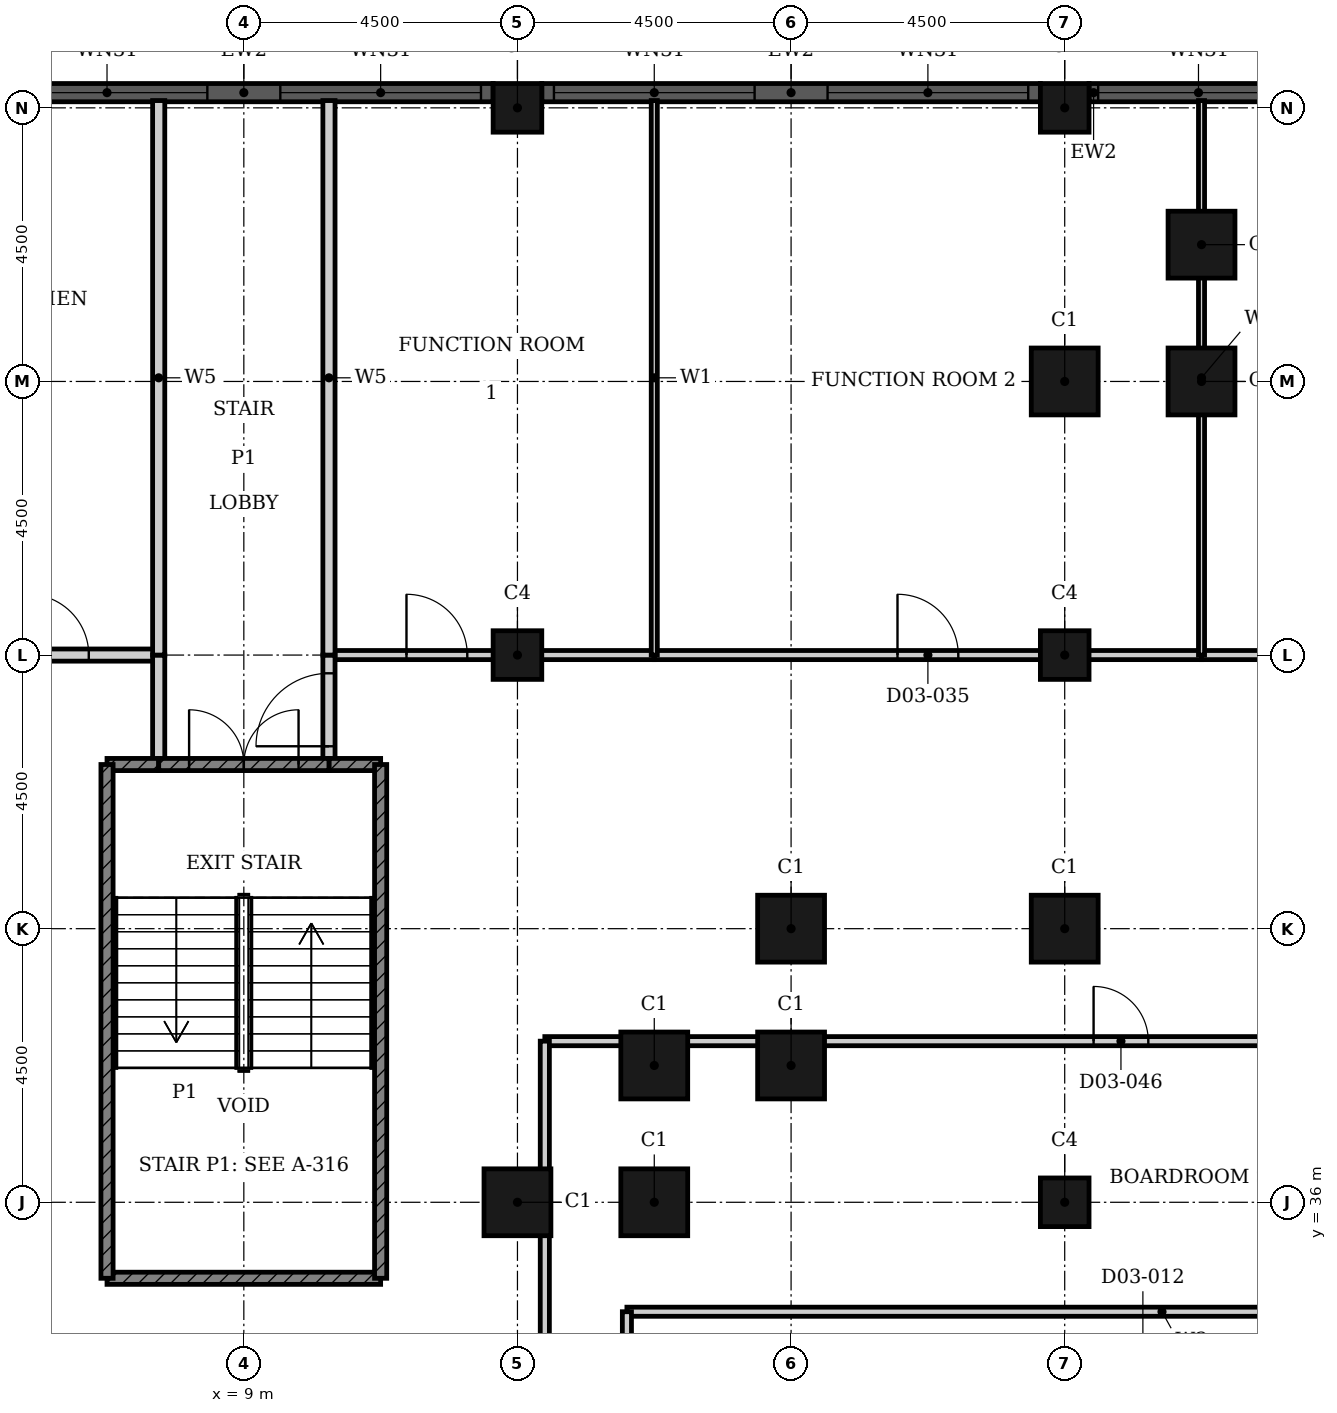
"""IFC4 building model, lengths in metres.
Left out: names, types, materials, properties, quantities, classifications, styles, units other than length and angle.
Written with IfcOpenShell. Run it as: python <this file> out.ifc"""

import sys

from ifc_helpers import new_model, si_unit, direction, frame, frame_2d, origin, origin_2d, place, context, subcontext, project, spatial, rectangle, hollow_rectangle, extrude, element, fill, save


model = new_model("IFC4")
c1 = context("Model", 3, precision=1e-05, world=origin(), true_north=direction((0.0, 1.0)))
c2 = subcontext(c1, "Body", "Model", "MODEL_VIEW")
j1 = project(units=[si_unit("LENGTHUNIT", "METRE"), si_unit("PLANEANGLEUNIT", "RADIAN")], contexts=[c1])
p1 = place(None, origin())
s1 = spatial("IfcSite", under=j1, at=p1, CompositionType="ELEMENT")
p2 = place(p1, origin())
s2 = spatial("IfcBuilding", under=s1, at=p2, CompositionType="ELEMENT")
p3 = place(p2, frame((0.0, 0.0, 17.4)))
s3 = spatial("IfcBuildingStorey", under=s2, at=p3, CompositionType="ELEMENT", Elevation=17.4)
for number, where, z_axis, x_axis in (
    (1, (24.75, 51.75, 0.0), (0.0, 0.0, 1.0), (1.0, 0.0, 0.0)),
    (2, (24.75, 49.5, 0.0), (0.0, 0.0, 1.0), (1.0, 0.0, 0.0)),
    (3, (22.5, 49.5, 0.0), (0.0, 0.0, 1.0), (1.0, 0.0, 0.0)),
    (4, (22.5, 40.5, 0.0), (0.0, 0.0, 1.0), (1.0, 0.0, 0.0)),
    (5, (18.0, 40.5, 0.0), (0.0, 0.0, 1.0), (1.0, 0.0, 0.0)),
    (6, (18.0, 38.25, 0.0), (0.0, 0.0, 1.0), (1.0, 0.0, 0.0)),
    (7, (15.75, 38.25, 0.0), (0.0, 0.0, 1.0), (1.0, 0.0, 0.0)),
    (8, (15.75, 36.0, 0.0), (0.0, 0.0, 1.0), (1.0, 0.0, 0.0)),
    (9, (13.5, 36.0, 0.0), (0.0, 0.0, 1.0), (1.0, 0.0, 0.0)),
):
    element("IfcColumn", number, at=place(p3, frame(where, z_axis=z_axis, x_axis=x_axis)), inside=s3, PredefinedType="COLUMN", context=c2, shape_type="SweptSolid", body=[
        extrude(hollow_rectangle(XDim=1.1, YDim=1.1, WallThickness=0.036, at=origin_2d()), origin(), (0.0, 0.0, 1.0), 6.6),
    ])
for number, where, z_axis, x_axis in (
    (10, (13.5, 54.0, 0.0), (0.0, 0.0, 1.0), (1.0, 0.0, 0.0)),
    (11, (22.5, 54.0, 0.0), (0.0, 0.0, 1.0), (1.0, 0.0, 0.0)),
    (12, (13.5, 45.0, 0.0), (0.0, 0.0, 1.0), (1.0, 0.0, 0.0)),
    (13, (22.5, 36.0, 0.0), (0.0, 0.0, 1.0), (1.0, 0.0, 0.0)),
    (14, (22.5, 45.0, 0.0), (0.0, 0.0, 1.0), (1.0, 0.0, 0.0)),
):
    element("IfcColumn", number, at=place(p3, frame(where, z_axis=z_axis, x_axis=x_axis)), inside=s3, PredefinedType="COLUMN", context=c2, shape_type="SweptSolid", body=[
        extrude(hollow_rectangle(XDim=0.8, YDim=0.8, WallThickness=0.025, at=origin_2d()), origin(), (0.0, 0.0, 1.0), 6.6),
    ])
p4 = place(p3, frame((26.45, 54.25, 0.0), z_axis=(0.0, 0.0, 1.0), x_axis=(-1.0, 0.0, 0.0)))
e15 = element("IfcWall", 15, at=p4, inside=s3, PredefinedType="SOLIDWALL", context=c2, shape_type="SweptSolid", body=[
    extrude(rectangle(XDim=3.55, YDim=0.3, at=frame_2d((1.775, 0.0))), origin(), (0.0, 0.0, 1.0), 6.6),
])
p5 = place(p4, frame((0.1, 0.0, 0.9)))
e16 = element("IfcOpeningElement", 16, at=p5, cuts=e15, PredefinedType="OPENING", context=c2, shape_type="SweptSolid", body=[
    extrude(rectangle(XDim=3.3, YDim=3.6, at=frame_2d((1.65, 1.8))), frame((0.0, 0.16, 0.0), z_axis=(0.0, -1.0, 0.0), x_axis=(1.0, 0.0, 0.0)), (0.0, 0.0, 1.0), 0.32),
])
p6 = place(p3, frame((22.1, 54.25, 0.0), z_axis=(0.0, 0.0, 1.0), x_axis=(-1.0, 0.0, 0.0)))
e17 = element("IfcWall", 17, at=p6, inside=s3, PredefinedType="SOLIDWALL", context=c2, shape_type="SweptSolid", body=[
    extrude(rectangle(XDim=8.2, YDim=0.3, at=frame_2d((4.1, 0.0))), origin(), (0.0, 0.0, 1.0), 6.6),
])
p7 = place(p6, frame((0.2, 0.0, 0.9)))
e18 = element("IfcOpeningElement", 18, at=p7, cuts=e17, PredefinedType="OPENING", context=c2, shape_type="SweptSolid", body=[
    extrude(rectangle(XDim=3.3, YDim=3.6, at=frame_2d((1.65, 1.8))), frame((0.0, 0.16, 0.0), z_axis=(0.0, -1.0, 0.0), x_axis=(1.0, 0.0, 0.0)), (0.0, 0.0, 1.0), 0.32),
])
p8 = place(p6, frame((4.7, 0.0, 0.9)))
e19 = element("IfcOpeningElement", 19, at=p8, cuts=e17, PredefinedType="OPENING", context=c2, shape_type="SweptSolid", body=[
    extrude(rectangle(XDim=3.3, YDim=3.6, at=frame_2d((1.65, 1.8))), frame((0.0, 0.16, 0.0), z_axis=(0.0, -1.0, 0.0), x_axis=(1.0, 0.0, 0.0)), (0.0, 0.0, 1.0), 0.32),
])
p9 = place(p3, frame((13.1, 54.25, 0.0), z_axis=(0.0, 0.0, 1.0), x_axis=(-1.0, 0.0, 0.0)))
e20 = element("IfcWall", 20, at=p9, inside=s3, PredefinedType="SOLIDWALL", context=c2, shape_type="SweptSolid", body=[
    extrude(rectangle(XDim=8.2, YDim=0.3, at=frame_2d((4.1, 0.0))), origin(), (0.0, 0.0, 1.0), 6.6),
])
p10 = place(p9, frame((0.2, 0.0, 0.9)))
e21 = element("IfcOpeningElement", 21, at=p10, cuts=e20, PredefinedType="OPENING", context=c2, shape_type="SweptSolid", body=[
    extrude(rectangle(XDim=3.3, YDim=3.6, at=frame_2d((1.65, 1.8))), frame((0.0, 0.16, 0.0), z_axis=(0.0, -1.0, 0.0), x_axis=(1.0, 0.0, 0.0)), (0.0, 0.0, 1.0), 0.32),
])
p11 = place(p9, frame((4.7, 0.0, 0.9)))
e22 = element("IfcOpeningElement", 22, at=p11, cuts=e20, PredefinedType="OPENING", context=c2, shape_type="SweptSolid", body=[
    extrude(rectangle(XDim=3.3, YDim=3.6, at=frame_2d((1.65, 1.8))), frame((0.0, 0.16, 0.0), z_axis=(0.0, -1.0, 0.0), x_axis=(1.0, 0.0, 0.0)), (0.0, 0.0, 1.0), 0.32),
])
p12 = place(p3, frame((15.3, 34.2, 0.0), z_axis=(0.0, 0.0, 1.0), x_axis=(1.0, 0.0, 0.0)))
e23 = element("IfcWall", 23, at=p12, inside=s3, PredefinedType="PARTITIONING", context=c2, shape_type="SweptSolid", body=[
    extrude(rectangle(XDim=17.6, YDim=0.15, at=frame_2d((8.8, 0.0))), origin(), (0.0, 0.0, 1.0), 6.25),
])
p13 = place(p3, frame((13.95, 38.65, 0.0), z_axis=(0.0, 0.0, 1.0), x_axis=(1.0, 0.0, 0.0)))
e24 = element("IfcWall", 24, at=p13, inside=s3, PredefinedType="PARTITIONING", context=c2, shape_type="SweptSolid", body=[
    extrude(rectangle(XDim=18.95, YDim=0.15, at=frame_2d((9.475, 0.0))), origin(), (0.0, 0.0, 1.0), 6.25),
])
p14 = place(p13, frame((9.025, 0.0, 0.0)))
e25 = element("IfcOpeningElement", 25, at=p14, cuts=e24, PredefinedType="OPENING", context=c2, shape_type="SweptSolid", body=[
    extrude(rectangle(XDim=0.9, YDim=2.1, at=frame_2d((0.45, 1.05))), frame((0.0, 0.085, 0.0), z_axis=(0.0, -1.0, 0.0), x_axis=(1.0, 0.0, 0.0)), (0.0, 0.0, 1.0), 0.17),
])
p15 = place(p3, frame((10.4, 45.0, 0.0), z_axis=(0.0, 0.0, 1.0), x_axis=(1.0, 0.0, 0.0)))
e26 = element("IfcWall", 26, at=p15, inside=s3, PredefinedType="PARTITIONING", context=c2, shape_type="SweptSolid", body=[
    extrude(rectangle(XDim=5.35, YDim=0.15, at=frame_2d((2.675, 0.0))), origin(), (0.0, 0.0, 1.0), 6.25),
])
p16 = place(p15, frame((1.275, 0.0, 0.0)))
e27 = element("IfcOpeningElement", 27, at=p16, cuts=e26, PredefinedType="OPENING", context=c2, shape_type="SweptSolid", body=[
    extrude(rectangle(XDim=1.0, YDim=2.1, at=frame_2d((0.5, 1.05))), frame((0.0, 0.085, 0.0), z_axis=(0.0, -1.0, 0.0), x_axis=(1.0, 0.0, 0.0)), (0.0, 0.0, 1.0), 0.17),
])
p17 = place(p3, frame((15.75, 45.0, 0.0), z_axis=(0.0, 0.0, 1.0), x_axis=(1.0, 0.0, 0.0)))
e28 = element("IfcWall", 28, at=p17, inside=s3, PredefinedType="PARTITIONING", context=c2, shape_type="SweptSolid", body=[
    extrude(rectangle(XDim=9.0, YDim=0.15, at=frame_2d((4.5, 0.0))), origin(), (0.0, 0.0, 1.0), 6.25),
])
p18 = place(p17, frame((4.0, 0.0, 0.0)))
e29 = element("IfcOpeningElement", 29, at=p18, cuts=e28, PredefinedType="OPENING", context=c2, shape_type="SweptSolid", body=[
    extrude(rectangle(XDim=1.0, YDim=2.1, at=frame_2d((0.5, 1.05))), frame((0.0, 0.085, 0.0), z_axis=(0.0, -1.0, 0.0), x_axis=(1.0, 0.0, 0.0)), (0.0, 0.0, 1.0), 0.17),
])
p19 = place(p3, frame((24.75, 45.0, 0.0), z_axis=(0.0, 0.0, 1.0), x_axis=(1.0, 0.0, 0.0)))
e30 = element("IfcWall", 30, at=p19, inside=s3, PredefinedType="PARTITIONING", context=c2, shape_type="SweptSolid", body=[
    extrude(rectangle(XDim=9.0, YDim=0.15, at=frame_2d((4.5, 0.0))), origin(), (0.0, 0.0, 1.0), 6.25),
])
p20 = place(p19, frame((4.0, 0.0, 0.0)))
e31 = element("IfcOpeningElement", 31, at=p20, cuts=e30, PredefinedType="OPENING", context=c2, shape_type="SweptSolid", body=[
    extrude(rectangle(XDim=1.0, YDim=2.1, at=frame_2d((0.5, 1.05))), frame((0.0, 0.085, 0.0), z_axis=(0.0, -1.0, 0.0), x_axis=(1.0, 0.0, 0.0)), (0.0, 0.0, 1.0), 0.17),
])
p21 = place(p3, frame((13.95, 32.05, 0.0), z_axis=(0.0, 0.0, 1.0), x_axis=(0.0, 1.0, 0.0)))
e32 = element("IfcWall", 32, at=p21, inside=s3, PredefinedType="PARTITIONING", context=c2, shape_type="SweptSolid", body=[
    extrude(rectangle(XDim=6.6, YDim=0.15, at=frame_2d((3.3, 0.0))), origin(), (0.0, 0.0, 1.0), 6.25),
])
p22 = place(p3, frame((15.3, 20.7, 0.0), z_axis=(0.0, 0.0, 1.0), x_axis=(0.0, 1.0, 0.0)))
e33 = element("IfcWall", 33, at=p22, inside=s3, PredefinedType="PARTITIONING", context=c2, shape_type="SweptSolid", body=[
    extrude(rectangle(XDim=13.5, YDim=0.15, at=frame_2d((6.75, 0.0))), origin(), (0.0, 0.0, 1.0), 6.25),
])
for number, where, z_axis, x_axis in (
    (34, (15.75, 45.0, 0.0), (0.0, 0.0, 1.0), (0.0, 1.0, 0.0)),
    (35, (24.75, 45.0, 0.0), (0.0, 0.0, 1.0), (0.0, 1.0, 0.0)),
):
    element("IfcWall", number, at=place(p3, frame(where, z_axis=z_axis, x_axis=x_axis)), inside=s3, PredefinedType="PARTITIONING", context=c2, shape_type="SweptSolid", body=[
        extrude(rectangle(XDim=9.12, YDim=0.1, at=frame_2d((4.56, 0.0))), origin(), (0.0, 0.0, 1.0), 6.25),
    ])
p23 = place(p3, frame((2.5, 45.0, 0.0), z_axis=(0.0, 0.0, 1.0), x_axis=(1.0, 0.0, 0.0)))
e36 = element("IfcWall", 36, at=p23, inside=s3, PredefinedType="PARTITIONING", context=c2, shape_type="SweptSolid", body=[
    extrude(rectangle(XDim=5.1, YDim=0.2, at=frame_2d((2.55, 0.0))), origin(), (0.0, 0.0, 1.0), 6.25),
])
p24 = place(p23, frame((2.95, 0.0, 0.0)))
e37 = element("IfcOpeningElement", 37, at=p24, cuts=e36, PredefinedType="OPENING", context=c2, shape_type="SweptSolid", body=[
    extrude(rectangle(XDim=1.0, YDim=2.1, at=frame_2d((0.5, 1.05))), frame((0.0, 0.11, 0.0), z_axis=(0.0, -1.0, 0.0), x_axis=(1.0, 0.0, 0.0)), (0.0, 0.0, 1.0), 0.22),
])
p25 = place(p3, frame((10.4, 43.2, 0.0), z_axis=(0.0, 0.0, 1.0), x_axis=(0.0, 1.0, 0.0)))
e38 = element("IfcWall", 38, at=p25, inside=s3, PredefinedType="PARTITIONING", context=c2, shape_type="SweptSolid", body=[
    extrude(rectangle(XDim=1.8, YDim=0.2, at=frame_2d((0.9, 0.0))), origin(), (0.0, 0.0, 1.0), 6.25),
])
p26 = place(p25, frame((0.3, 0.0, 0.0)))
e39 = element("IfcOpeningElement", 39, at=p26, cuts=e38, PredefinedType="OPENING", context=c2, shape_type="SweptSolid", body=[
    extrude(rectangle(XDim=1.2, YDim=2.1, at=frame_2d((0.6, 1.05))), frame((0.0, 0.11, 0.0), z_axis=(0.0, -1.0, 0.0), x_axis=(1.0, 0.0, 0.0)), (0.0, 0.0, 1.0), 0.22),
])
p27 = place(p3, frame((10.4, 45.0, 0.0), z_axis=(0.0, 0.0, 1.0), x_axis=(0.0, 1.0, 0.0)))
e40 = element("IfcWall", 40, at=p27, inside=s3, PredefinedType="PARTITIONING", context=c2, shape_type="SweptSolid", body=[
    extrude(rectangle(XDim=9.12, YDim=0.2, at=frame_2d((4.56, 0.0))), origin(), (0.0, 0.0, 1.0), 6.25),
])
p28 = place(p3, frame((7.6, 43.2, 0.0), z_axis=(0.0, 0.0, 1.0), x_axis=(0.0, 1.0, 0.0)))
e41 = element("IfcWall", 41, at=p28, inside=s3, PredefinedType="PARTITIONING", context=c2, shape_type="SweptSolid", body=[
    extrude(rectangle(XDim=1.8, YDim=0.2, at=frame_2d((0.9, 0.0))), origin(), (0.0, 0.0, 1.0), 6.25),
])
p29 = place(p3, frame((7.6, 45.0, 0.0), z_axis=(0.0, 0.0, 1.0), x_axis=(0.0, 1.0, 0.0)))
e42 = element("IfcWall", 42, at=p29, inside=s3, PredefinedType="PARTITIONING", context=c2, shape_type="SweptSolid", body=[
    extrude(rectangle(XDim=9.12, YDim=0.2, at=frame_2d((4.56, 0.0))), origin(), (0.0, 0.0, 1.0), 6.25),
])
p30 = place(p3, frame((6.75, 34.75, 0.0), z_axis=(0.0, 0.0, 1.0), x_axis=(1.0, 0.0, 0.0)))
e43 = element("IfcWall", 43, at=p30, inside=s3, PredefinedType="SHEAR", context=c2, shape_type="SweptSolid", body=[
    extrude(rectangle(XDim=4.5, YDim=0.2, at=frame_2d((2.25, 0.0))), origin(), (0.0, 0.0, 1.0), 6.25),
])
for number, where, z_axis, x_axis in (
    (44, (6.75, 43.2, 0.0), (0.0, 0.0, 1.0), (1.0, 0.0, 0.0)),
    (45, (10.4, 43.2, 0.0), (0.0, 0.0, 1.0), (1.0, 0.0, 0.0)),
):
    element("IfcWall", number, at=place(p3, frame(where, z_axis=z_axis, x_axis=x_axis)), inside=s3, PredefinedType="SHEAR", context=c2, shape_type="SweptSolid", body=[
        extrude(rectangle(XDim=0.85, YDim=0.2, at=frame_2d((0.425, 0.0))), origin(), (0.0, 0.0, 1.0), 6.25),
    ])
p31 = place(p3, frame((7.6, 43.2, 0.0), z_axis=(0.0, 0.0, 1.0), x_axis=(1.0, 0.0, 0.0)))
e46 = element("IfcWall", 46, at=p31, inside=s3, PredefinedType="SHEAR", context=c2, shape_type="SweptSolid", body=[
    extrude(rectangle(XDim=2.8, YDim=0.2, at=frame_2d((1.4, 0.0))), origin(), (0.0, 0.0, 1.0), 6.25),
])
p32 = place(p31, frame((0.5, 0.0, 0.0)))
e47 = element("IfcOpeningElement", 47, at=p32, cuts=e46, PredefinedType="OPENING", context=c2, shape_type="SweptSolid", body=[
    extrude(rectangle(XDim=1.8, YDim=2.1, at=frame_2d((0.9, 1.05))), frame((0.0, 0.11, 0.0), z_axis=(0.0, -1.0, 0.0), x_axis=(1.0, 0.0, 0.0)), (0.0, 0.0, 1.0), 0.22),
])
for number, where, z_axis, x_axis in (
    (48, (11.25, 34.75, 0.0), (0.0, 0.0, 1.0), (0.0, 1.0, 0.0)),
    (49, (6.75, 34.75, 0.0), (0.0, 0.0, 1.0), (0.0, 1.0, 0.0)),
):
    element("IfcWall", number, at=place(p3, frame(where, z_axis=z_axis, x_axis=x_axis)), inside=s3, PredefinedType="SHEAR", context=c2, shape_type="SweptSolid", body=[
        extrude(rectangle(XDim=8.45, YDim=0.2, at=frame_2d((4.225, 0.0))), origin(), (0.0, 0.0, 1.0), 6.25),
    ])
p33 = place(p5, origin())
e50 = element("IfcWindow", 50, at=p33, inside=s3, PartitioningType="SINGLE_PANEL", PredefinedType="WINDOW", context=c2, shape_type="SweptSolid", body=[
    extrude(rectangle(XDim=3.3, YDim=3.6, at=frame_2d((1.65, 1.8))), frame((0.0, 0.03, 0.0), z_axis=(0.0, -1.0, 0.0), x_axis=(1.0, 0.0, 0.0)), (0.0, 0.0, 1.0), 0.06),
])
fill(e16, e50)
p34 = place(p7, origin())
e51 = element("IfcWindow", 51, at=p34, inside=s3, PartitioningType="SINGLE_PANEL", PredefinedType="WINDOW", context=c2, shape_type="SweptSolid", body=[
    extrude(rectangle(XDim=3.3, YDim=3.6, at=frame_2d((1.65, 1.8))), frame((0.0, 0.03, 0.0), z_axis=(0.0, -1.0, 0.0), x_axis=(1.0, 0.0, 0.0)), (0.0, 0.0, 1.0), 0.06),
])
fill(e18, e51)
p35 = place(p8, origin())
e52 = element("IfcWindow", 52, at=p35, inside=s3, PartitioningType="SINGLE_PANEL", PredefinedType="WINDOW", context=c2, shape_type="SweptSolid", body=[
    extrude(rectangle(XDim=3.3, YDim=3.6, at=frame_2d((1.65, 1.8))), frame((0.0, 0.03, 0.0), z_axis=(0.0, -1.0, 0.0), x_axis=(1.0, 0.0, 0.0)), (0.0, 0.0, 1.0), 0.06),
])
fill(e19, e52)
p36 = place(p10, origin())
e53 = element("IfcWindow", 53, at=p36, inside=s3, PartitioningType="SINGLE_PANEL", PredefinedType="WINDOW", context=c2, shape_type="SweptSolid", body=[
    extrude(rectangle(XDim=3.3, YDim=3.6, at=frame_2d((1.65, 1.8))), frame((0.0, 0.03, 0.0), z_axis=(0.0, -1.0, 0.0), x_axis=(1.0, 0.0, 0.0)), (0.0, 0.0, 1.0), 0.06),
])
fill(e21, e53)
p37 = place(p11, origin())
e54 = element("IfcWindow", 54, at=p37, inside=s3, PartitioningType="SINGLE_PANEL", PredefinedType="WINDOW", context=c2, shape_type="SweptSolid", body=[
    extrude(rectangle(XDim=3.3, YDim=3.6, at=frame_2d((1.65, 1.8))), frame((0.0, 0.03, 0.0), z_axis=(0.0, -1.0, 0.0), x_axis=(1.0, 0.0, 0.0)), (0.0, 0.0, 1.0), 0.06),
])
fill(e22, e54)
p38 = place(p26, origin())
e55 = element("IfcDoor", 55, at=p38, inside=s3, OperationType="SINGLE_SWING_LEFT", PredefinedType="DOOR", context=c2, shape_type="SweptSolid", body=[
    extrude(rectangle(XDim=1.2, YDim=2.1, at=frame_2d((0.6, 1.05))), frame((0.0, 0.025, 0.0), z_axis=(0.0, -1.0, 0.0), x_axis=(1.0, 0.0, 0.0)), (0.0, 0.0, 1.0), 0.05),
])
fill(e39, e55)
p39 = place(p32, origin())
e56 = element("IfcDoor", 56, at=p39, inside=s3, OperationType="DOUBLE_DOOR_SINGLE_SWING", PredefinedType="DOOR", context=c2, shape_type="SweptSolid", body=[
    extrude(rectangle(XDim=1.8, YDim=2.1, at=frame_2d((0.9, 1.05))), frame((0.0, 0.025, 0.0), z_axis=(0.0, -1.0, 0.0), x_axis=(1.0, 0.0, 0.0)), (0.0, 0.0, 1.0), 0.05),
])
fill(e47, e56)
p40 = place(p24, origin())
e57 = element("IfcDoor", 57, at=p40, inside=s3, OperationType="SINGLE_SWING_RIGHT", PredefinedType="DOOR", context=c2, shape_type="SweptSolid", body=[
    extrude(rectangle(XDim=1.0, YDim=2.1, at=frame_2d((0.5, 1.05))), frame((0.0, 0.025, 0.0), z_axis=(0.0, -1.0, 0.0), x_axis=(1.0, 0.0, 0.0)), (0.0, 0.0, 1.0), 0.05),
])
fill(e37, e57)
p41 = place(p16, origin())
e58 = element("IfcDoor", 58, at=p41, inside=s3, OperationType="SINGLE_SWING_LEFT", PredefinedType="DOOR", context=c2, shape_type="SweptSolid", body=[
    extrude(rectangle(XDim=1.0, YDim=2.1, at=frame_2d((0.5, 1.05))), frame((0.0, 0.025, 0.0), z_axis=(0.0, -1.0, 0.0), x_axis=(1.0, 0.0, 0.0)), (0.0, 0.0, 1.0), 0.05),
])
fill(e27, e58)
p42 = place(p18, origin())
e59 = element("IfcDoor", 59, at=p42, inside=s3, OperationType="SINGLE_SWING_RIGHT", PredefinedType="DOOR", context=c2, shape_type="SweptSolid", body=[
    extrude(rectangle(XDim=1.0, YDim=2.1, at=frame_2d((0.5, 1.05))), frame((0.0, 0.025, 0.0), z_axis=(0.0, -1.0, 0.0), x_axis=(1.0, 0.0, 0.0)), (0.0, 0.0, 1.0), 0.05),
])
fill(e29, e59)
p43 = place(p14, origin())
e60 = element("IfcDoor", 60, at=p43, inside=s3, OperationType="SINGLE_SWING_RIGHT", PredefinedType="DOOR", context=c2, shape_type="SweptSolid", body=[
    extrude(rectangle(XDim=0.9, YDim=2.1, at=frame_2d((0.45, 1.05))), frame((0.0, 0.025, 0.0), z_axis=(0.0, -1.0, 0.0), x_axis=(1.0, 0.0, 0.0)), (0.0, 0.0, 1.0), 0.05),
])
fill(e25, e60)
save(model, sys.argv[1])
